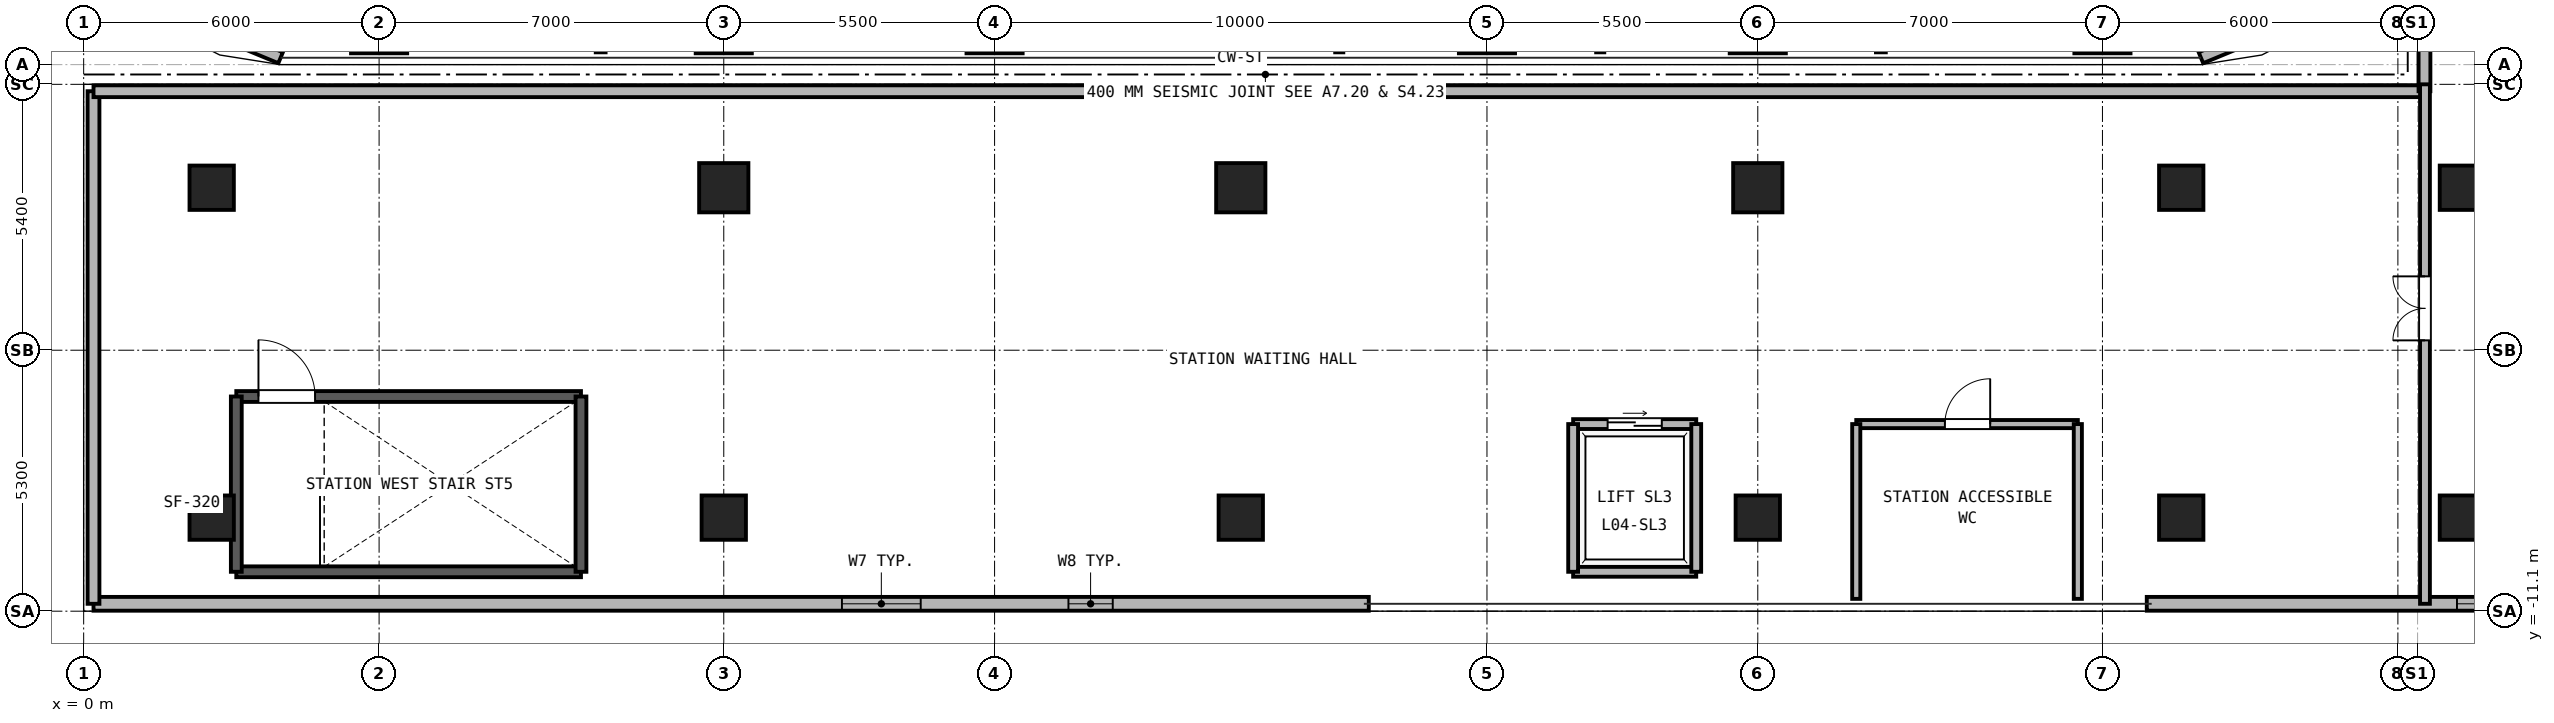
"""IFC4 building model, lengths in metres.
Left out: names, types, materials, properties, quantities, classifications, styles, units other than length and angle.
Written with IfcOpenShell. Run it as: python <this file> out.ifc"""

import sys

from ifc_helpers import new_model, si_unit, direction, frame, frame_2d, origin, origin_2d, place, context, subcontext, project, spatial, rectangle, hollow_rectangle, circle, extrude, source, transform, mapped, element, fill, save


model = new_model("IFC4")
c1 = context("Model", 3, precision=1e-05, world=origin(), true_north=direction((0.0, 1.0)))
c2 = subcontext(c1, "Body", "Model", "MODEL_VIEW")
j1 = project(units=[si_unit("LENGTHUNIT", "METRE"), si_unit("PLANEANGLEUNIT", "RADIAN")], contexts=[c1])
p1 = place(None, origin())
s1 = spatial("IfcSite", under=j1, at=p1, CompositionType="ELEMENT")
p2 = place(p1, origin())
s2 = spatial("IfcBuilding", under=s1, at=p2, CompositionType="ELEMENT")
p3 = place(p2, frame((0.0, 0.0, 18.0)))
s3 = spatial("IfcBuildingStorey", under=s2, at=p3, CompositionType="ELEMENT", Elevation=18.0)
m1 = source(origin(), c2, "Body", "SweptSolid", [
    extrude(hollow_rectangle(XDim=1.14, YDim=1.14, WallThickness=0.07, at=origin_2d()), origin(), (0.0, 0.0, 1.0), 4.14),
])
for number, where, z_axis, x_axis in (
    (1, (6.0, 0.8, 0.0), (0.0, 0.0, 1.0), (1.0, 0.0, 0.0)),
    (2, (13.0, 0.8, 0.0), (0.0, 0.0, 1.0), (1.0, 0.0, 0.0)),
    (3, (18.5, 0.8, 0.0), (0.0, 0.0, 1.0), (1.0, 0.0, 0.0)),
    (4, (28.5, 0.8, 0.0), (0.0, 0.0, 1.0), (1.0, 0.0, 0.0)),
    (5, (34.0, 0.8, 0.0), (0.0, 0.0, 1.0), (1.0, 0.0, 0.0)),
    (6, (41.0, 0.8, 0.0), (0.0, 0.0, 1.0), (1.0, 0.0, 0.0)),
):
    element("IfcColumn", number, at=place(p3, frame(where, z_axis=z_axis, x_axis=x_axis)), inside=s3, PredefinedType="COLUMN", context=c2, shape_type="MappedRepresentation", body=[
        mapped(m1, transform((0.0, 0.0, 0.0), x_axis=(1.0, 0.0, 0.0), y_axis=(0.0, 1.0, 0.0), z_axis=(0.0, 0.0, 1.0), scale=1.0)),
    ])
m2 = source(origin(), c2, "Body", "SweptSolid", [
    extrude(hollow_rectangle(XDim=0.7, YDim=0.9, WallThickness=0.04, at=origin_2d()), origin(), (0.0, 0.0, 1.0), 4.2),
])
for number, where, z_axis, x_axis in (
    (7, (2.6, -9.2, 0.0), (0.0, 0.0, 1.0), (1.0, 0.0, 0.0)),
    (8, (2.6, -2.5, 0.0), (0.0, 0.0, 1.0), (1.0, 0.0, 0.0)),
    (9, (13.0, -9.2, 0.0), (0.0, 0.0, 1.0), (1.0, 0.0, 0.0)),
):
    element("IfcColumn", number, at=place(p3, frame(where, z_axis=z_axis, x_axis=x_axis)), inside=s3, PredefinedType="COLUMN", context=c2, shape_type="MappedRepresentation", body=[
        mapped(m2, transform((0.0, 0.0, 0.0), x_axis=(1.0, 0.0, 0.0), y_axis=(0.0, 1.0, 0.0), z_axis=(0.0, 0.0, 1.0), scale=1.0)),
    ])
m3 = source(origin(), c2, "Body", "SweptSolid", [
    extrude(circle(Radius=0.5, at=origin_2d()), origin(), (0.0, 0.0, 1.0), 4.2),
])
p4 = place(p3, frame((13.0, -2.5, 0.0), z_axis=(0.0, 0.0, 1.0), x_axis=(1.0, 0.0, 0.0)))
e10 = element("IfcColumn", 10, at=p4, inside=s3, PredefinedType="COLUMN", context=c2, shape_type="MappedRepresentation", body=[
    mapped(m3, transform((0.0, 0.0, 0.0), x_axis=(1.0, 0.0, 0.0), y_axis=(0.0, 1.0, 0.0), z_axis=(0.0, 0.0, 1.0), scale=1.0)),
])
p5 = place(p3, frame((23.5, -9.2, 0.0), z_axis=(0.0, 0.0, 1.0), x_axis=(1.0, 0.0, 0.0)))
e11 = element("IfcColumn", 11, at=p5, inside=s3, PredefinedType="COLUMN", context=c2, shape_type="MappedRepresentation", body=[
    mapped(m2, transform((0.0, 0.0, 0.0), x_axis=(1.0, 0.0, 0.0), y_axis=(0.0, 1.0, 0.0), z_axis=(0.0, 0.0, 1.0), scale=1.0)),
])
p6 = place(p3, frame((23.5, -2.5, 0.0), z_axis=(0.0, 0.0, 1.0), x_axis=(1.0, 0.0, 0.0)))
e12 = element("IfcColumn", 12, at=p6, inside=s3, PredefinedType="COLUMN", context=c2, shape_type="MappedRepresentation", body=[
    mapped(m3, transform((0.0, 0.0, 0.0), x_axis=(1.0, 0.0, 0.0), y_axis=(0.0, 1.0, 0.0), z_axis=(0.0, 0.0, 1.0), scale=1.0)),
])
p7 = place(p3, frame((34.0, -9.2, 0.0), z_axis=(0.0, 0.0, 1.0), x_axis=(1.0, 0.0, 0.0)))
e13 = element("IfcColumn", 13, at=p7, inside=s3, PredefinedType="COLUMN", context=c2, shape_type="MappedRepresentation", body=[
    mapped(m2, transform((0.0, 0.0, 0.0), x_axis=(1.0, 0.0, 0.0), y_axis=(0.0, 1.0, 0.0), z_axis=(0.0, 0.0, 1.0), scale=1.0)),
])
p8 = place(p3, frame((34.0, -2.5, 0.0), z_axis=(0.0, 0.0, 1.0), x_axis=(1.0, 0.0, 0.0)))
e14 = element("IfcColumn", 14, at=p8, inside=s3, PredefinedType="COLUMN", context=c2, shape_type="MappedRepresentation", body=[
    mapped(m3, transform((0.0, 0.0, 0.0), x_axis=(1.0, 0.0, 0.0), y_axis=(0.0, 1.0, 0.0), z_axis=(0.0, 0.0, 1.0), scale=1.0)),
])
for number, where, z_axis, x_axis in (
    (15, (42.6, -9.2, 0.0), (0.0, 0.0, 1.0), (1.0, 0.0, 0.0)),
    (16, (42.6, -2.5, 0.0), (0.0, 0.0, 1.0), (1.0, 0.0, 0.0)),
    (17, (48.3, -9.2, 0.0), (0.0, 0.0, 1.0), (1.0, 0.0, 0.0)),
    (18, (48.3, -2.5, 0.0), (0.0, 0.0, 1.0), (1.0, 0.0, 0.0)),
):
    element("IfcColumn", number, at=place(p3, frame(where, z_axis=z_axis, x_axis=x_axis)), inside=s3, PredefinedType="COLUMN", context=c2, shape_type="MappedRepresentation", body=[
        mapped(m2, transform((0.0, 0.0, 0.0), x_axis=(1.0, 0.0, 0.0), y_axis=(0.0, 1.0, 0.0), z_axis=(0.0, 0.0, 1.0), scale=1.0)),
    ])
for number, where, z_axis, x_axis in (
    (19, (43.0, 0.14, 0.0), (0.0, 0.0, 1.0), (0.924, 0.383, 0.0)),
    (20, (1.271, 1.271, 0.0), (0.0, 0.0, 1.0), (0.924, -0.383, 0.0)),
):
    element("IfcWall", number, at=place(p3, frame(where, z_axis=z_axis, x_axis=x_axis)), inside=s3, PredefinedType="SOLIDWALL", context=c2, shape_type="SweptSolid", body=[
        extrude(rectangle(XDim=2.954, YDim=0.24, at=frame_2d((1.477, 0.0))), origin(), (0.0, 0.0, 1.0), 4.14),
    ])
p9 = place(p3, frame((0.2, -10.95, 0.0), z_axis=(0.0, 0.0, 1.0), x_axis=(1.0, 0.0, 0.0)))
e21 = element("IfcWall", 21, at=p9, inside=s3, PredefinedType="SOLIDWALL", context=c2, shape_type="SweptSolid", body=[
    extrude(rectangle(XDim=25.9, YDim=0.28, at=frame_2d((12.95, 0.0))), origin(), (0.0, 0.0, 1.0), 4.2),
])
p10 = place(p9, frame((15.2, 0.0, 1.1)))
e22 = element("IfcOpeningElement", 22, at=p10, cuts=e21, PredefinedType="OPENING", context=c2, shape_type="SweptSolid", body=[
    extrude(rectangle(XDim=1.6, YDim=1.4, at=frame_2d((0.8, 0.7))), frame((0.0, 0.15, 0.0), z_axis=(0.0, -1.0, 0.0), x_axis=(1.0, 0.0, 0.0)), (0.0, 0.0, 1.0), 0.3),
])
p11 = place(p9, frame((19.8, 0.0, 1.1)))
e23 = element("IfcOpeningElement", 23, at=p11, cuts=e21, PredefinedType="OPENING", context=c2, shape_type="SweptSolid", body=[
    extrude(rectangle(XDim=0.9, YDim=1.5, at=frame_2d((0.45, 0.75))), frame((0.0, 0.15, 0.0), z_axis=(0.0, -1.0, 0.0), x_axis=(1.0, 0.0, 0.0)), (0.0, 0.0, 1.0), 0.3),
])
p12 = place(p3, frame((41.9, -10.95, 0.0), z_axis=(0.0, 0.0, 1.0), x_axis=(1.0, 0.0, 0.0)))
e24 = element("IfcWall", 24, at=p12, inside=s3, PredefinedType="SOLIDWALL", context=c2, shape_type="SweptSolid", body=[
    extrude(rectangle(XDim=29.55, YDim=0.28, at=frame_2d((14.775, 0.0))), origin(), (0.0, 0.0, 1.0), 4.2),
])
p13 = place(p12, frame((6.3, 0.0, 1.1)))
e25 = element("IfcOpeningElement", 25, at=p13, cuts=e24, PredefinedType="OPENING", context=c2, shape_type="SweptSolid", body=[
    extrude(rectangle(XDim=1.6, YDim=1.4, at=frame_2d((0.8, 0.7))), frame((0.0, 0.15, 0.0), z_axis=(0.0, -1.0, 0.0), x_axis=(1.0, 0.0, 0.0)), (0.0, 0.0, 1.0), 0.3),
])
p14 = place(p3, frame((0.2, -10.95, 0.0), z_axis=(0.0, 0.0, 1.0), x_axis=(0.0, 1.0, 0.0)))
e26 = element("IfcWall", 26, at=p14, inside=s3, PredefinedType="SOLIDWALL", context=c2, shape_type="SweptSolid", body=[
    extrude(rectangle(XDim=10.41, YDim=0.24, at=frame_2d((5.205, 0.0))), origin(), (0.0, 0.0, 1.0), 4.2),
])
p15 = place(p3, frame((0.2, -0.54, 0.0), z_axis=(0.0, 0.0, 1.0), x_axis=(1.0, 0.0, 0.0)))
e27 = element("IfcWall", 27, at=p15, inside=s3, PredefinedType="SOLIDWALL", context=c2, shape_type="SweptSolid", body=[
    extrude(rectangle(XDim=47.34, YDim=0.24, at=frame_2d((23.67, 0.0))), origin(), (0.0, 0.0, 1.0), 4.2),
])
p16 = place(p3, frame((47.54, -0.54, 0.0), z_axis=(0.0, 0.0, 1.0), x_axis=(0.0, 1.0, 0.0)))
e28 = element("IfcWall", 28, at=p16, inside=s3, PredefinedType="SOLIDWALL", context=c2, shape_type="SweptSolid", body=[
    extrude(rectangle(XDim=40.89, YDim=0.24, at=frame_2d((20.445, 0.0))), origin(), (0.0, 0.0, 1.0), 4.2),
])
p17 = place(p3, frame((3.1, -10.3, 0.0), z_axis=(0.0, 0.0, 1.0), x_axis=(1.0, 0.0, 0.0)))
e29 = element("IfcWall", 29, at=p17, inside=s3, PredefinedType="SOLIDWALL", context=c2, shape_type="SweptSolid", body=[
    extrude(rectangle(XDim=7.0, YDim=0.22, at=frame_2d((3.5, 0.0))), origin(), (0.0, 0.0, 1.0), 4.14),
])
p18 = place(p3, frame((3.1, -6.74, 0.0), z_axis=(0.0, 0.0, 1.0), x_axis=(1.0, 0.0, 0.0)))
e30 = element("IfcWall", 30, at=p18, inside=s3, PredefinedType="SOLIDWALL", context=c2, shape_type="SweptSolid", body=[
    extrude(rectangle(XDim=7.0, YDim=0.22, at=frame_2d((3.5, 0.0))), origin(), (0.0, 0.0, 1.0), 4.14),
])
p19 = place(p18, frame((0.45, 0.0, 0.0)))
e31 = element("IfcOpeningElement", 31, at=p19, cuts=e30, PredefinedType="OPENING", context=c2, shape_type="SweptSolid", body=[
    extrude(rectangle(XDim=1.15, YDim=2.2, at=frame_2d((0.575, 1.1))), frame((0.0, 0.12, 0.0), z_axis=(0.0, -1.0, 0.0), x_axis=(1.0, 0.0, 0.0)), (0.0, 0.0, 1.0), 0.24),
])
for number, where, z_axis, x_axis in (
    (32, (3.1, -10.3, 0.0), (0.0, 0.0, 1.0), (0.0, 1.0, 0.0)),
    (33, (10.1, -10.3, 0.0), (0.0, 0.0, 1.0), (0.0, 1.0, 0.0)),
):
    element("IfcWall", number, at=place(p3, frame(where, z_axis=z_axis, x_axis=x_axis)), inside=s3, PredefinedType="SOLIDWALL", context=c2, shape_type="SweptSolid", body=[
        extrude(rectangle(XDim=3.56, YDim=0.22, at=frame_2d((1.78, 0.0))), origin(), (0.0, 0.0, 1.0), 4.14),
    ])
p20 = place(p3, frame((30.25, -10.3, 0.0), z_axis=(0.0, 0.0, 1.0), x_axis=(1.0, 0.0, 0.0)))
e34 = element("IfcWall", 34, at=p20, inside=s3, PredefinedType="PARTITIONING", context=c2, shape_type="SweptSolid", body=[
    extrude(rectangle(XDim=2.5, YDim=0.2, at=frame_2d((1.25, 0.0))), origin(), (0.0, 0.0, 1.0), 4.14),
])
p21 = place(p3, frame((30.25, -7.3, 0.0), z_axis=(0.0, 0.0, 1.0), x_axis=(1.0, 0.0, 0.0)))
e35 = element("IfcWall", 35, at=p21, inside=s3, PredefinedType="PARTITIONING", context=c2, shape_type="SweptSolid", body=[
    extrude(rectangle(XDim=2.5, YDim=0.2, at=frame_2d((1.25, 0.0))), origin(), (0.0, 0.0, 1.0), 4.14),
])
p22 = place(p21, frame((0.7, 0.0, 0.0)))
e36 = element("IfcOpeningElement", 36, at=p22, cuts=e35, PredefinedType="OPENING", context=c2, shape_type="SweptSolid", body=[
    extrude(rectangle(XDim=1.1, YDim=2.25, at=frame_2d((0.55, 1.125))), frame((0.0, 0.11, 0.0), z_axis=(0.0, -1.0, 0.0), x_axis=(1.0, 0.0, 0.0)), (0.0, 0.0, 1.0), 0.22),
])
for number, where, z_axis, x_axis in (
    (37, (30.25, -10.3, 0.0), (0.0, 0.0, 1.0), (0.0, 1.0, 0.0)),
    (38, (32.75, -10.3, 0.0), (0.0, 0.0, 1.0), (0.0, 1.0, 0.0)),
):
    element("IfcWall", number, at=place(p3, frame(where, z_axis=z_axis, x_axis=x_axis)), inside=s3, PredefinedType="PARTITIONING", context=c2, shape_type="SweptSolid", body=[
        extrude(rectangle(XDim=3.0, YDim=0.2, at=frame_2d((1.5, 0.0))), origin(), (0.0, 0.0, 1.0), 4.14),
    ])
p23 = place(p3, frame((47.55, -10.95, 0.0), z_axis=(0.0, 0.0, 1.0), x_axis=(0.0, 1.0, 0.0)))
e39 = element("IfcWall", 39, at=p23, inside=s3, PredefinedType="PARTITIONING", context=c2, shape_type="SweptSolid", body=[
    extrude(rectangle(XDim=10.55, YDim=0.2, at=frame_2d((5.275, 0.0))), origin(), (0.0, 0.0, 1.0), 4.14),
])
p24 = place(p23, frame((5.35, 0.0, 0.0)))
e40 = element("IfcOpeningElement", 40, at=p24, cuts=e39, PredefinedType="OPENING", context=c2, shape_type="SweptSolid", body=[
    extrude(rectangle(XDim=1.3, YDim=2.2, at=frame_2d((0.65, 1.1))), frame((0.0, 0.11, 0.0), z_axis=(0.0, -1.0, 0.0), x_axis=(1.0, 0.0, 0.0)), (0.0, 0.0, 1.0), 0.22),
])
p25 = place(p3, frame((36.0, -7.3, 0.0), z_axis=(0.0, 0.0, 1.0), x_axis=(1.0, 0.0, 0.0)))
e41 = element("IfcWall", 41, at=p25, inside=s3, PredefinedType="PARTITIONING", context=c2, shape_type="SweptSolid", body=[
    extrude(rectangle(XDim=4.5, YDim=0.165, at=frame_2d((2.25, 0.0))), origin(), (0.0, 0.0, 1.0), 4.14),
])
p26 = place(p25, frame((1.8, 0.0, 0.0)))
e42 = element("IfcOpeningElement", 42, at=p26, cuts=e41, PredefinedType="OPENING", context=c2, shape_type="SweptSolid", body=[
    extrude(rectangle(XDim=0.92, YDim=2.1, at=frame_2d((0.46, 1.05))), frame((0.0, 0.093, 0.0), z_axis=(0.0, -1.0, 0.0), x_axis=(1.0, 0.0, 0.0)), (0.0, 0.0, 1.0), 0.185),
])
for number, where, z_axis, x_axis in (
    (43, (36.0, -10.85, 0.0), (0.0, 0.0, 1.0), (0.0, 1.0, 0.0)),
    (44, (40.5, -10.85, 0.0), (0.0, 0.0, 1.0), (0.0, 1.0, 0.0)),
):
    element("IfcWall", number, at=place(p3, frame(where, z_axis=z_axis, x_axis=x_axis)), inside=s3, PredefinedType="PARTITIONING", context=c2, shape_type="SweptSolid", body=[
        extrude(rectangle(XDim=3.55, YDim=0.165, at=frame_2d((1.775, 0.0))), origin(), (0.0, 0.0, 1.0), 4.14),
    ])
p27 = place(p10, origin())
e45 = element("IfcWindow", 45, at=p27, inside=s3, PartitioningType="SINGLE_PANEL", PredefinedType="WINDOW", context=c2, shape_type="SweptSolid", body=[
    extrude(rectangle(XDim=1.6, YDim=1.4, at=frame_2d((0.8, 0.7))), frame((0.0, 0.03, 0.0), z_axis=(0.0, -1.0, 0.0), x_axis=(1.0, 0.0, 0.0)), (0.0, 0.0, 1.0), 0.06),
])
fill(e22, e45)
p28 = place(p11, origin())
e46 = element("IfcWindow", 46, at=p28, inside=s3, PartitioningType="SINGLE_PANEL", PredefinedType="WINDOW", context=c2, shape_type="SweptSolid", body=[
    extrude(rectangle(XDim=0.9, YDim=1.5, at=frame_2d((0.45, 0.75))), frame((0.0, 0.03, 0.0), z_axis=(0.0, -1.0, 0.0), x_axis=(1.0, 0.0, 0.0)), (0.0, 0.0, 1.0), 0.06),
])
fill(e23, e46)
p29 = place(p13, origin())
e47 = element("IfcWindow", 47, at=p29, inside=s3, PartitioningType="SINGLE_PANEL", PredefinedType="WINDOW", context=c2, shape_type="SweptSolid", body=[
    extrude(rectangle(XDim=1.6, YDim=1.4, at=frame_2d((0.8, 0.7))), frame((0.0, 0.03, 0.0), z_axis=(0.0, -1.0, 0.0), x_axis=(1.0, 0.0, 0.0)), (0.0, 0.0, 1.0), 0.06),
])
fill(e25, e47)
p30 = place(p19, origin())
e48 = element("IfcDoor", 48, at=p30, inside=s3, OperationType="SINGLE_SWING_LEFT", PredefinedType="DOOR", context=c2, shape_type="SweptSolid", body=[
    extrude(rectangle(XDim=1.15, YDim=2.2, at=frame_2d((0.575, 1.1))), frame((0.0, 0.025, 0.0), z_axis=(0.0, -1.0, 0.0), x_axis=(1.0, 0.0, 0.0)), (0.0, 0.0, 1.0), 0.05),
])
fill(e31, e48)
p31 = place(p22, origin())
e49 = element("IfcDoor", 49, at=p31, inside=s3, OperationType="DOUBLE_DOOR_SLIDING", PredefinedType="DOOR", context=c2, shape_type="SweptSolid", body=[
    extrude(rectangle(XDim=1.1, YDim=2.25, at=frame_2d((0.55, 1.125))), frame((0.0, 0.025, 0.0), z_axis=(0.0, -1.0, 0.0), x_axis=(1.0, 0.0, 0.0)), (0.0, 0.0, 1.0), 0.05),
])
fill(e36, e49)
p32 = place(p24, origin())
e50 = element("IfcDoor", 50, at=p32, inside=s3, OperationType="DOUBLE_DOOR_SINGLE_SWING", PredefinedType="DOOR", context=c2, shape_type="SweptSolid", body=[
    extrude(rectangle(XDim=1.3, YDim=2.2, at=frame_2d((0.65, 1.1))), frame((0.0, 0.025, 0.0), z_axis=(0.0, -1.0, 0.0), x_axis=(1.0, 0.0, 0.0)), (0.0, 0.0, 1.0), 0.05),
])
fill(e40, e50)
p33 = place(p26, origin())
e51 = element("IfcDoor", 51, at=p33, inside=s3, OperationType="SINGLE_SWING_RIGHT", PredefinedType="DOOR", context=c2, shape_type="SweptSolid", body=[
    extrude(rectangle(XDim=0.92, YDim=2.1, at=frame_2d((0.46, 1.05))), frame((0.0, 0.025, 0.0), z_axis=(0.0, -1.0, 0.0), x_axis=(1.0, 0.0, 0.0)), (0.0, 0.0, 1.0), 0.05),
])
fill(e42, e51)
save(model, sys.argv[1])
